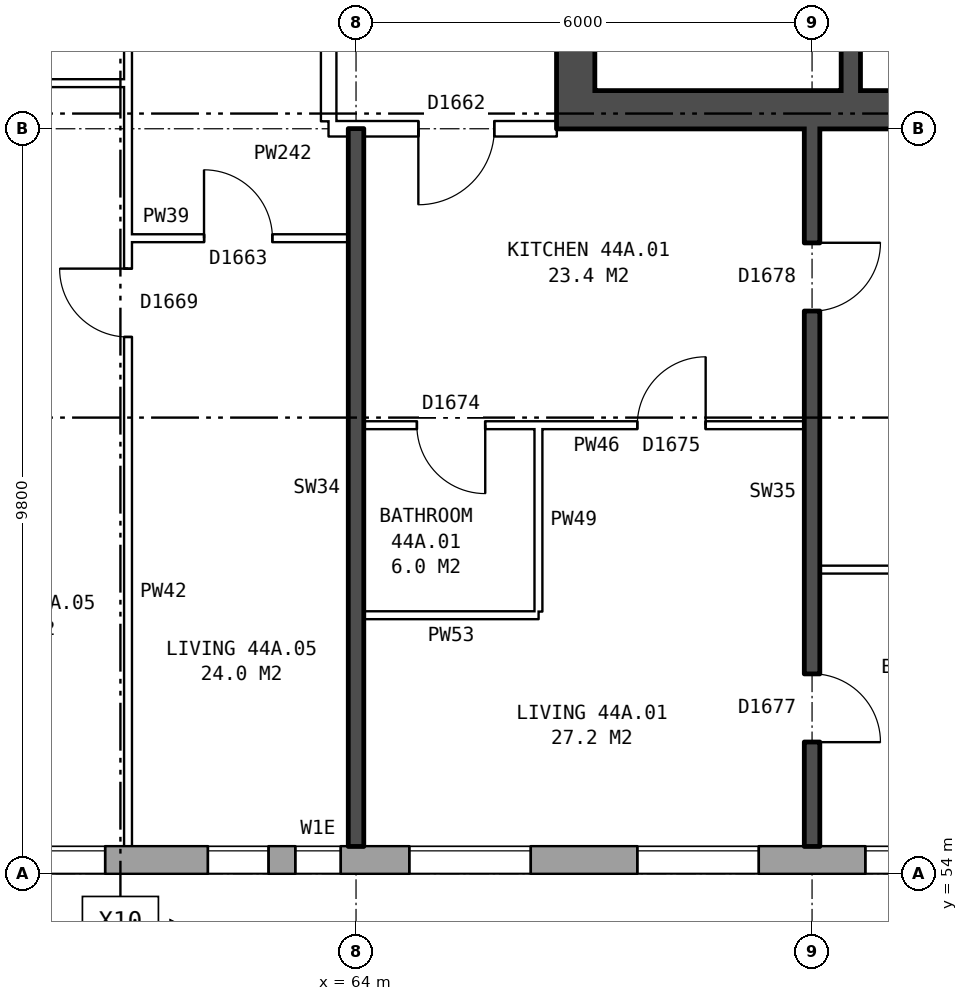
"""IFC4 building model, lengths in metres.
Left out: names, types, materials, properties, quantities, classifications, styles, units other than length and angle.
Written with IfcOpenShell. Run it as: python <this file> out.ifc"""

import sys

from ifc_helpers import new_model, si_unit, direction, frame, frame_2d, origin, place, context, subcontext, project, spatial, rectangle, extrude, element, fill, save


model = new_model("IFC4")
c1 = context("Model", 3, precision=1e-05, world=origin(), true_north=direction((0.0, 1.0)))
c2 = subcontext(c1, "Body", "Model", "MODEL_VIEW")
j1 = project(units=[si_unit("LENGTHUNIT", "METRE"), si_unit("PLANEANGLEUNIT", "RADIAN")], contexts=[c1])
p1 = place(None, origin())
s1 = spatial("IfcSite", under=j1, at=p1, CompositionType="ELEMENT")
p2 = place(p1, origin())
s2 = spatial("IfcBuilding", under=s1, at=p2, CompositionType="ELEMENT")
p3 = place(p2, frame((0.0, 0.0, 157.8)))
s3 = spatial("IfcBuildingStorey", under=s2, at=p3, CompositionType="ELEMENT", Elevation=157.8)
p4 = place(p3, frame((31.575, 54.18, 0.0), z_axis=(0.0, 0.0, 1.0), x_axis=(1.0, 0.0, 0.0)))
e1 = element("IfcWall", 1, at=p4, inside=s3, PredefinedType="STANDARD", context=c2, shape_type="SweptSolid", body=[
    extrude(rectangle(XDim=41.351, YDim=0.36, at=frame_2d((20.675, 0.0))), origin(), (0.0, 0.0, 1.0), 2.85),
])
p5 = place(p4, frame((3.125, 0.0, 0.8)))
e2 = element("IfcOpeningElement", 2, at=p5, cuts=e1, PredefinedType="OPENING", context=c2, shape_type="SweptSolid", body=[
    extrude(rectangle(XDim=1.6, YDim=1.8, at=frame_2d((0.8, 0.9))), frame((0.0, 0.19, 0.0), z_axis=(0.0, -1.0, 0.0), x_axis=(1.0, 0.0, 0.0)), (0.0, 0.0, 1.0), 0.38),
])
p6 = place(p4, frame((6.125, 0.0, 0.8)))
e3 = element("IfcOpeningElement", 3, at=p6, cuts=e1, PredefinedType="OPENING", context=c2, shape_type="SweptSolid", body=[
    extrude(rectangle(XDim=1.6, YDim=1.8, at=frame_2d((0.8, 0.9))), frame((0.0, 0.19, 0.0), z_axis=(0.0, -1.0, 0.0), x_axis=(1.0, 0.0, 0.0)), (0.0, 0.0, 1.0), 0.38),
])
p7 = place(p4, frame((8.625, 0.0, 0.8)))
e4 = element("IfcOpeningElement", 4, at=p7, cuts=e1, PredefinedType="OPENING", context=c2, shape_type="SweptSolid", body=[
    extrude(rectangle(XDim=1.0, YDim=1.8, at=frame_2d((0.5, 0.9))), frame((0.0, 0.19, 0.0), z_axis=(0.0, -1.0, 0.0), x_axis=(1.0, 0.0, 0.0)), (0.0, 0.0, 1.0), 0.38),
])
p8 = place(p4, frame((9.925, 0.0, 1.6)))
e5 = element("IfcOpeningElement", 5, at=p8, cuts=e1, PredefinedType="OPENING", context=c2, shape_type="SweptSolid", body=[
    extrude(rectangle(XDim=0.8, YDim=0.9, at=frame_2d((0.4, 0.45))), frame((0.0, 0.19, 0.0), z_axis=(0.0, -1.0, 0.0), x_axis=(1.0, 0.0, 0.0)), (0.0, 0.0, 1.0), 0.38),
])
p9 = place(p4, frame((15.125, 0.0, 0.8)))
e6 = element("IfcOpeningElement", 6, at=p9, cuts=e1, PredefinedType="OPENING", context=c2, shape_type="SweptSolid", body=[
    extrude(rectangle(XDim=1.6, YDim=1.8, at=frame_2d((0.8, 0.9))), frame((0.0, 0.19, 0.0), z_axis=(0.0, -1.0, 0.0), x_axis=(1.0, 0.0, 0.0)), (0.0, 0.0, 1.0), 0.38),
])
p10 = place(p4, frame((18.125, 0.0, 0.8)))
e7 = element("IfcOpeningElement", 7, at=p10, cuts=e1, PredefinedType="OPENING", context=c2, shape_type="SweptSolid", body=[
    extrude(rectangle(XDim=1.6, YDim=1.8, at=frame_2d((0.8, 0.9))), frame((0.0, 0.19, 0.0), z_axis=(0.0, -1.0, 0.0), x_axis=(1.0, 0.0, 0.0)), (0.0, 0.0, 1.0), 0.38),
])
p11 = place(p4, frame((21.125, 0.0, 0.8)))
e8 = element("IfcOpeningElement", 8, at=p11, cuts=e1, PredefinedType="OPENING", context=c2, shape_type="SweptSolid", body=[
    extrude(rectangle(XDim=1.6, YDim=1.8, at=frame_2d((0.8, 0.9))), frame((0.0, 0.19, 0.0), z_axis=(0.0, -1.0, 0.0), x_axis=(1.0, 0.0, 0.0)), (0.0, 0.0, 1.0), 0.38),
])
p12 = place(p4, frame((24.125, 0.0, 0.8)))
e9 = element("IfcOpeningElement", 9, at=p12, cuts=e1, PredefinedType="OPENING", context=c2, shape_type="SweptSolid", body=[
    extrude(rectangle(XDim=1.6, YDim=1.8, at=frame_2d((0.8, 0.9))), frame((0.0, 0.19, 0.0), z_axis=(0.0, -1.0, 0.0), x_axis=(1.0, 0.0, 0.0)), (0.0, 0.0, 1.0), 0.38),
])
p13 = place(p4, frame((26.625, 0.0, 0.8)))
e10 = element("IfcOpeningElement", 10, at=p13, cuts=e1, PredefinedType="OPENING", context=c2, shape_type="SweptSolid", body=[
    extrude(rectangle(XDim=1.4, YDim=1.8, at=frame_2d((0.7, 0.9))), frame((0.0, 0.19, 0.0), z_axis=(0.0, -1.0, 0.0), x_axis=(1.0, 0.0, 0.0)), (0.0, 0.0, 1.0), 0.38),
])
p14 = place(p4, frame((30.475, 0.0, 1.7)))
e11 = element("IfcOpeningElement", 11, at=p14, cuts=e1, PredefinedType="OPENING", context=c2, shape_type="SweptSolid", body=[
    extrude(rectangle(XDim=0.8, YDim=0.9, at=frame_2d((0.4, 0.45))), frame((0.0, 0.19, 0.0), z_axis=(0.0, -1.0, 0.0), x_axis=(1.0, 0.0, 0.0)), (0.0, 0.0, 1.0), 0.38),
])
p15 = place(p4, frame((33.125, 0.0, 0.8)))
e12 = element("IfcOpeningElement", 12, at=p15, cuts=e1, PredefinedType="OPENING", context=c2, shape_type="SweptSolid", body=[
    extrude(rectangle(XDim=1.6, YDim=1.8, at=frame_2d((0.8, 0.9))), frame((0.0, 0.19, 0.0), z_axis=(0.0, -1.0, 0.0), x_axis=(1.0, 0.0, 0.0)), (0.0, 0.0, 1.0), 0.38),
])
p16 = place(p4, frame((36.125, 0.0, 0.8)))
e13 = element("IfcOpeningElement", 13, at=p16, cuts=e1, PredefinedType="OPENING", context=c2, shape_type="SweptSolid", body=[
    extrude(rectangle(XDim=1.6, YDim=1.8, at=frame_2d((0.8, 0.9))), frame((0.0, 0.19, 0.0), z_axis=(0.0, -1.0, 0.0), x_axis=(1.0, 0.0, 0.0)), (0.0, 0.0, 1.0), 0.38),
])
p17 = place(p4, frame((39.125, 0.0, 0.8)))
e14 = element("IfcOpeningElement", 14, at=p17, cuts=e1, PredefinedType="OPENING", context=c2, shape_type="SweptSolid", body=[
    extrude(rectangle(XDim=1.6, YDim=1.8, at=frame_2d((0.8, 0.9))), frame((0.0, 0.19, 0.0), z_axis=(0.0, -1.0, 0.0), x_axis=(1.0, 0.0, 0.0)), (0.0, 0.0, 1.0), 0.38),
])
p18 = place(p4, frame((12.125, 0.0, 0.8)))
e15 = element("IfcOpeningElement", 15, at=p18, cuts=e1, PredefinedType="OPENING", context=c2, shape_type="SweptSolid", body=[
    extrude(rectangle(XDim=1.0, YDim=0.9, at=frame_2d((0.5, 0.45))), frame((0.0, 0.19, 0.0), z_axis=(0.0, -1.0, 0.0), x_axis=(1.0, 0.0, 0.0)), (0.0, 0.0, 1.0), 0.38),
])
p19 = place(p4, frame((13.425, 0.0, 0.8)))
e16 = element("IfcOpeningElement", 16, at=p19, cuts=e1, PredefinedType="OPENING", context=c2, shape_type="SweptSolid", body=[
    extrude(rectangle(XDim=0.8, YDim=1.8, at=frame_2d((0.4, 0.9))), frame((0.0, 0.19, 0.0), z_axis=(0.0, -1.0, 0.0), x_axis=(1.0, 0.0, 0.0)), (0.0, 0.0, 1.0), 0.38),
])
p20 = place(p4, frame((28.325, 0.0, 0.8)))
e17 = element("IfcOpeningElement", 17, at=p20, cuts=e1, PredefinedType="OPENING", context=c2, shape_type="SweptSolid", body=[
    extrude(rectangle(XDim=0.8, YDim=0.9, at=frame_2d((0.4, 0.45))), frame((0.0, 0.19, 0.0), z_axis=(0.0, -1.0, 0.0), x_axis=(1.0, 0.0, 0.0)), (0.0, 0.0, 1.0), 0.38),
])
p21 = place(p4, frame((31.625, 0.0, 0.8)))
e18 = element("IfcOpeningElement", 18, at=p21, cuts=e1, PredefinedType="OPENING", context=c2, shape_type="SweptSolid", body=[
    extrude(rectangle(XDim=0.6, YDim=1.8, at=frame_2d((0.3, 0.9))), frame((0.0, 0.19, 0.0), z_axis=(0.0, -1.0, 0.0), x_axis=(1.0, 0.0, 0.0)), (0.0, 0.0, 1.0), 0.38),
])
p22 = place(p3, frame((66.89, 63.8, 0.0), z_axis=(0.0, 0.0, 1.0), x_axis=(0.0, 1.0, 0.0)))
e19 = element("IfcWall", 19, at=p22, inside=s3, PredefinedType="SHEAR", context=c2, shape_type="SweptSolid", body=[
    extrude(rectangle(XDim=12.4, YDim=0.5, at=frame_2d((6.2, 0.0))), origin(), (0.0, 0.0, 1.0), 2.85),
])
p23 = place(p22, frame((1.325, 0.0, 0.0)))
e20 = element("IfcOpeningElement", 20, at=p23, cuts=e19, PredefinedType="OPENING", context=c2, shape_type="SweptSolid", body=[
    extrude(rectangle(XDim=1.1, YDim=2.1, at=frame_2d((0.55, 1.05))), frame((0.0, 0.26, 0.0), z_axis=(0.0, -1.0, 0.0), x_axis=(1.0, 0.0, 0.0)), (0.0, 0.0, 1.0), 0.52),
])
p24 = place(p22, frame((3.6, 0.0, 0.0)))
e21 = element("IfcOpeningElement", 21, at=p24, cuts=e19, PredefinedType="OPENING", context=c2, shape_type="SweptSolid", body=[
    extrude(rectangle(XDim=1.1, YDim=2.1, at=frame_2d((0.55, 1.05))), frame((0.0, 0.26, 0.0), z_axis=(0.0, -1.0, 0.0), x_axis=(1.0, 0.0, 0.0)), (0.0, 0.0, 1.0), 0.52),
])
p25 = place(p22, frame((5.8, 0.0, 0.0)))
e22 = element("IfcOpeningElement", 22, at=p25, cuts=e19, PredefinedType="OPENING", context=c2, shape_type="SweptSolid", body=[
    extrude(rectangle(XDim=1.1, YDim=2.1, at=frame_2d((0.55, 1.05))), frame((0.0, 0.26, 0.0), z_axis=(0.0, -1.0, 0.0), x_axis=(1.0, 0.0, 0.0)), (0.0, 0.0, 1.0), 0.52),
])
p26 = place(p22, frame((8.0, 0.0, 0.0)))
e23 = element("IfcOpeningElement", 23, at=p26, cuts=e19, PredefinedType="OPENING", context=c2, shape_type="SweptSolid", body=[
    extrude(rectangle(XDim=1.1, YDim=2.1, at=frame_2d((0.55, 1.05))), frame((0.0, 0.26, 0.0), z_axis=(0.0, -1.0, 0.0), x_axis=(1.0, 0.0, 0.0)), (0.0, 0.0, 1.0), 0.52),
])
p27 = place(p22, frame((9.9, 0.0, 0.0)))
e24 = element("IfcOpeningElement", 24, at=p27, cuts=e19, PredefinedType="OPENING", context=c2, shape_type="SweptSolid", body=[
    extrude(rectangle(XDim=1.1, YDim=2.1, at=frame_2d((0.55, 1.05))), frame((0.0, 0.26, 0.0), z_axis=(0.0, -1.0, 0.0), x_axis=(1.0, 0.0, 0.0)), (0.0, 0.0, 1.0), 0.52),
])
p28 = place(p3, frame((67.14, 64.05, 0.0), z_axis=(0.0, 0.0, 1.0), x_axis=(1.0, 0.0, 0.0)))
e25 = element("IfcWall", 25, at=p28, inside=s3, PredefinedType="SHEAR", context=c2, shape_type="SweptSolid", body=[
    extrude(rectangle(XDim=8.0, YDim=0.5, at=frame_2d((4.0, 0.0))), origin(), (0.0, 0.0, 1.0), 2.85),
])
p29 = place(p3, frame((70.51, 64.3, 0.0), z_axis=(0.0, 0.0, 1.0), x_axis=(0.0, 1.0, 0.0)))
e26 = element("IfcWall", 26, at=p29, inside=s3, PredefinedType="SHEAR", context=c2, shape_type="SweptSolid", body=[
    extrude(rectangle(XDim=2.425, YDim=0.25, at=frame_2d((1.212, 0.0))), origin(), (0.0, 0.0, 1.0), 2.85),
])
p30 = place(p3, frame((63.64, 63.9, 0.0), z_axis=(0.0, 0.0, 1.0), x_axis=(0.0, 1.0, 0.0)))
e27 = element("IfcWall", 27, at=p30, inside=s3, PredefinedType="PARTITIONING", context=c2, shape_type="SweptSolid", body=[
    extrude(rectangle(XDim=12.2, YDim=0.2, at=frame_2d((6.1, 0.0))), origin(), (0.0, 0.0, 1.0), 2.85),
])
p31 = place(p30, frame((5.1, 0.0, 0.0)))
e28 = element("IfcOpeningElement", 28, at=p31, cuts=e27, PredefinedType="OPENING", context=c2, shape_type="SweptSolid", body=[
    extrude(rectangle(XDim=2.0, YDim=2.1, at=frame_2d((1.0, 1.05))), frame((0.0, 0.11, 0.0), z_axis=(0.0, -1.0, 0.0), x_axis=(1.0, 0.0, 0.0)), (0.0, 0.0, 1.0), 0.22),
])
p32 = place(p3, frame((64.1, 57.4, 0.0), z_axis=(0.0, 0.0, 1.0), x_axis=(1.0, 0.0, 0.0)))
e29 = element("IfcWall", 29, at=p32, inside=s3, PredefinedType="PARTITIONING", context=c2, shape_type="SweptSolid", body=[
    extrude(rectangle(XDim=2.3, YDim=0.1, at=frame_2d((1.15, 0.0))), origin(), (0.0, 0.0, 1.0), 2.85),
])
p33 = place(p3, frame((70.1, 58.0, 0.0), z_axis=(0.0, 0.0, 1.0), x_axis=(1.0, 0.0, 0.0)))
e30 = element("IfcWall", 30, at=p33, inside=s3, PredefinedType="PARTITIONING", context=c2, shape_type="SweptSolid", body=[
    extrude(rectangle(XDim=5.54, YDim=0.1, at=frame_2d((2.77, 0.0))), origin(), (0.0, 0.0, 1.0), 2.85),
])
p34 = place(p3, frame((64.1, 59.9, 0.0), z_axis=(0.0, 0.0, 1.0), x_axis=(1.0, 0.0, 0.0)))
e31 = element("IfcWall", 31, at=p34, inside=s3, PredefinedType="PARTITIONING", context=c2, shape_type="SweptSolid", body=[
    extrude(rectangle(XDim=5.8, YDim=0.1, at=frame_2d((2.9, 0.0))), origin(), (0.0, 0.0, 1.0), 2.85),
])
p35 = place(p34, frame((3.6, 0.0, 0.0)))
e32 = element("IfcOpeningElement", 32, at=p35, cuts=e31, PredefinedType="OPENING", context=c2, shape_type="SweptSolid", body=[
    extrude(rectangle(XDim=0.9, YDim=2.1, at=frame_2d((0.45, 1.05))), frame((0.0, 0.06, 0.0), z_axis=(0.0, -1.0, 0.0), x_axis=(1.0, 0.0, 0.0)), (0.0, 0.0, 1.0), 0.12),
])
p36 = place(p34, frame((0.7, 0.0, 0.0)))
e33 = element("IfcOpeningElement", 33, at=p36, cuts=e31, PredefinedType="OPENING", context=c2, shape_type="SweptSolid", body=[
    extrude(rectangle(XDim=0.9, YDim=2.1, at=frame_2d((0.45, 1.05))), frame((0.0, 0.06, 0.0), z_axis=(0.0, -1.0, 0.0), x_axis=(1.0, 0.0, 0.0)), (0.0, 0.0, 1.0), 0.12),
])
p37 = place(p3, frame((61.0, 62.36, 0.0), z_axis=(0.0, 0.0, 1.0), x_axis=(1.0, 0.0, 0.0)))
e34 = element("IfcWall", 34, at=p37, inside=s3, PredefinedType="PARTITIONING", context=c2, shape_type="SweptSolid", body=[
    extrude(rectangle(XDim=2.9, YDim=0.1, at=frame_2d((1.45, 0.0))), origin(), (0.0, 0.0, 1.0), 2.85),
])
p38 = place(p37, frame((1.0, 0.0, 0.0)))
e35 = element("IfcOpeningElement", 35, at=p38, cuts=e34, PredefinedType="OPENING", context=c2, shape_type="SweptSolid", body=[
    extrude(rectangle(XDim=0.9, YDim=2.1, at=frame_2d((0.45, 1.05))), frame((0.0, 0.06, 0.0), z_axis=(0.0, -1.0, 0.0), x_axis=(1.0, 0.0, 0.0)), (0.0, 0.0, 1.0), 0.12),
])
p39 = place(p3, frame((63.64, 63.8, 0.0), z_axis=(0.0, 0.0, 1.0), x_axis=(1.0, 0.0, 0.0)))
e36 = element("IfcWall", 36, at=p39, inside=s3, PredefinedType="PARTITIONING", context=c2, shape_type="SweptSolid", body=[
    extrude(rectangle(XDim=3.0, YDim=0.2, at=frame_2d((1.5, 0.0))), origin(), (0.0, 0.0, 1.0), 2.85),
])
p40 = place(p39, frame((1.18, 0.0, 0.0)))
e37 = element("IfcOpeningElement", 37, at=p40, cuts=e36, PredefinedType="OPENING", context=c2, shape_type="SweptSolid", body=[
    extrude(rectangle(XDim=1.0, YDim=2.1, at=frame_2d((0.5, 1.05))), frame((0.0, 0.11, 0.0), z_axis=(0.0, -1.0, 0.0), x_axis=(1.0, 0.0, 0.0)), (0.0, 0.0, 1.0), 0.22),
])
p41 = place(p3, frame((58.1, 64.4, 0.0), z_axis=(0.0, 0.0, 1.0), x_axis=(1.0, 0.0, 0.0)))
e38 = element("IfcWall", 38, at=p41, inside=s3, PredefinedType="PARTITIONING", context=c2, shape_type="SweptSolid", body=[
    extrude(rectangle(XDim=2.9, YDim=0.1, at=frame_2d((1.45, 0.0))), origin(), (0.0, 0.0, 1.0), 2.85),
])
p42 = place(p3, frame((61.0, 54.36, 0.0), z_axis=(0.0, 0.0, 1.0), x_axis=(0.0, 1.0, 0.0)))
e39 = element("IfcWall", 39, at=p42, inside=s3, PredefinedType="PARTITIONING", context=c2, shape_type="SweptSolid", body=[
    extrude(rectangle(XDim=14.34, YDim=0.1, at=frame_2d((7.17, 0.0))), origin(), (0.0, 0.0, 1.0), 2.85),
])
p43 = place(p42, frame((6.7, 0.0, 0.0)))
e40 = element("IfcOpeningElement", 40, at=p43, cuts=e39, PredefinedType="OPENING", context=c2, shape_type="SweptSolid", body=[
    extrude(rectangle(XDim=0.9, YDim=2.1, at=frame_2d((0.45, 1.05))), frame((0.0, 0.06, 0.0), z_axis=(0.0, -1.0, 0.0), x_axis=(1.0, 0.0, 0.0)), (0.0, 0.0, 1.0), 0.12),
])
p44 = place(p42, frame((12.54, 0.0, 0.0)))
e41 = element("IfcOpeningElement", 41, at=p44, cuts=e39, PredefinedType="OPENING", context=c2, shape_type="SweptSolid", body=[
    extrude(rectangle(XDim=0.9, YDim=2.1, at=frame_2d((0.45, 1.05))), frame((0.0, 0.06, 0.0), z_axis=(0.0, -1.0, 0.0), x_axis=(1.0, 0.0, 0.0)), (0.0, 0.0, 1.0), 0.12),
])
p45 = place(p3, frame((64.0, 54.36, 0.0), z_axis=(0.0, 0.0, 1.0), x_axis=(0.0, 1.0, 0.0)))
e42 = element("IfcWall", 42, at=p45, inside=s3, PredefinedType="SOLIDWALL", context=c2, shape_type="SweptSolid", body=[
    extrude(rectangle(XDim=9.44, YDim=0.2, at=frame_2d((4.72, 0.0))), origin(), (0.0, 0.0, 1.0), 2.85),
])
p46 = place(p3, frame((66.4, 57.45, 0.0), z_axis=(0.0, 0.0, 1.0), x_axis=(0.0, 1.0, 0.0)))
e43 = element("IfcWall", 43, at=p46, inside=s3, PredefinedType="PARTITIONING", context=c2, shape_type="SweptSolid", body=[
    extrude(rectangle(XDim=2.4, YDim=0.1, at=frame_2d((1.2, 0.0))), origin(), (0.0, 0.0, 1.0), 2.85),
])
p47 = place(p3, frame((70.0, 54.36, 0.0), z_axis=(0.0, 0.0, 1.0), x_axis=(0.0, 1.0, 0.0)))
e44 = element("IfcWall", 44, at=p47, inside=s3, PredefinedType="SOLIDWALL", context=c2, shape_type="SweptSolid", body=[
    extrude(rectangle(XDim=9.44, YDim=0.2, at=frame_2d((4.72, 0.0))), origin(), (0.0, 0.0, 1.0), 2.85),
])
p48 = place(p47, frame((1.37, 0.0, 0.0)))
e45 = element("IfcOpeningElement", 45, at=p48, cuts=e44, PredefinedType="OPENING", context=c2, shape_type="SweptSolid", body=[
    extrude(rectangle(XDim=0.9, YDim=2.1, at=frame_2d((0.45, 1.05))), frame((0.0, 0.11, 0.0), z_axis=(0.0, -1.0, 0.0), x_axis=(1.0, 0.0, 0.0)), (0.0, 0.0, 1.0), 0.22),
])
p49 = place(p47, frame((7.04, 0.0, 0.0)))
e46 = element("IfcOpeningElement", 46, at=p49, cuts=e44, PredefinedType="OPENING", context=c2, shape_type="SweptSolid", body=[
    extrude(rectangle(XDim=0.9, YDim=2.1, at=frame_2d((0.45, 1.05))), frame((0.0, 0.11, 0.0), z_axis=(0.0, -1.0, 0.0), x_axis=(1.0, 0.0, 0.0)), (0.0, 0.0, 1.0), 0.22),
])
p50 = place(p14, origin())
e47 = element("IfcWindow", 47, at=p50, inside=s3, PartitioningType="SINGLE_PANEL", PredefinedType="WINDOW", context=c2, shape_type="SweptSolid", body=[
    extrude(rectangle(XDim=0.8, YDim=0.9, at=frame_2d((0.4, 0.45))), frame((0.0, 0.15, 0.0), z_axis=(0.0, -1.0, 0.0), x_axis=(1.0, 0.0, 0.0)), (0.0, 0.0, 1.0), 0.06),
])
fill(e11, e47)
p51 = place(p15, origin())
e48 = element("IfcWindow", 48, at=p51, inside=s3, PartitioningType="SINGLE_PANEL", PredefinedType="WINDOW", context=c2, shape_type="SweptSolid", body=[
    extrude(rectangle(XDim=1.6, YDim=1.8, at=frame_2d((0.8, 0.9))), frame((0.0, 0.15, 0.0), z_axis=(0.0, -1.0, 0.0), x_axis=(1.0, 0.0, 0.0)), (0.0, 0.0, 1.0), 0.06),
])
fill(e12, e48)
p52 = place(p16, origin())
e49 = element("IfcWindow", 49, at=p52, inside=s3, PartitioningType="SINGLE_PANEL", PredefinedType="WINDOW", context=c2, shape_type="SweptSolid", body=[
    extrude(rectangle(XDim=1.6, YDim=1.8, at=frame_2d((0.8, 0.9))), frame((0.0, 0.15, 0.0), z_axis=(0.0, -1.0, 0.0), x_axis=(1.0, 0.0, 0.0)), (0.0, 0.0, 1.0), 0.06),
])
fill(e13, e49)
p53 = place(p17, origin())
e50 = element("IfcWindow", 50, at=p53, inside=s3, PartitioningType="SINGLE_PANEL", PredefinedType="WINDOW", context=c2, shape_type="SweptSolid", body=[
    extrude(rectangle(XDim=1.6, YDim=1.8, at=frame_2d((0.8, 0.9))), frame((0.0, 0.15, 0.0), z_axis=(0.0, -1.0, 0.0), x_axis=(1.0, 0.0, 0.0)), (0.0, 0.0, 1.0), 0.06),
])
fill(e14, e50)
p54 = place(p48, frame((0.9, 0.0, 0.0), z_axis=(0.0, 0.0, 1.0), x_axis=(-1.0, 0.0, 0.0)))
e51 = element("IfcDoor", 51, at=p54, inside=s3, OperationType="SINGLE_SWING_RIGHT", PredefinedType="DOOR", context=c2, shape_type="SweptSolid", body=[
    extrude(rectangle(XDim=0.9, YDim=2.1, at=frame_2d((0.45, 1.05))), frame((0.0, 0.025, 0.0), z_axis=(0.0, -1.0, 0.0), x_axis=(1.0, 0.0, 0.0)), (0.0, 0.0, 1.0), 0.05),
])
fill(e45, e51)
p55 = place(p49, frame((0.9, 0.0, 0.0), z_axis=(0.0, 0.0, 1.0), x_axis=(-1.0, 0.0, 0.0)))
e52 = element("IfcDoor", 52, at=p55, inside=s3, OperationType="SINGLE_SWING_LEFT", PredefinedType="DOOR", context=c2, shape_type="SweptSolid", body=[
    extrude(rectangle(XDim=0.9, YDim=2.1, at=frame_2d((0.45, 1.05))), frame((0.0, 0.025, 0.0), z_axis=(0.0, -1.0, 0.0), x_axis=(1.0, 0.0, 0.0)), (0.0, 0.0, 1.0), 0.05),
])
fill(e46, e52)
p56 = place(p40, frame((1.0, 0.0, 0.0), z_axis=(0.0, 0.0, 1.0), x_axis=(-1.0, 0.0, 0.0)))
e53 = element("IfcDoor", 53, at=p56, inside=s3, OperationType="SINGLE_SWING_RIGHT", PredefinedType="DOOR", context=c2, shape_type="SweptSolid", body=[
    extrude(rectangle(XDim=1.0, YDim=2.1, at=frame_2d((0.5, 1.05))), frame((0.0, 0.025, 0.0), z_axis=(0.0, -1.0, 0.0), x_axis=(1.0, 0.0, 0.0)), (0.0, 0.0, 1.0), 0.05),
])
fill(e37, e53)
p57 = place(p35, origin())
e54 = element("IfcDoor", 54, at=p57, inside=s3, OperationType="SINGLE_SWING_RIGHT", PredefinedType="DOOR", context=c2, shape_type="SweptSolid", body=[
    extrude(rectangle(XDim=0.9, YDim=2.1, at=frame_2d((0.45, 1.05))), frame((0.0, 0.025, 0.0), z_axis=(0.0, -1.0, 0.0), x_axis=(1.0, 0.0, 0.0)), (0.0, 0.0, 1.0), 0.05),
])
fill(e32, e54)
p58 = place(p36, frame((0.9, 0.0, 0.0), z_axis=(0.0, 0.0, 1.0), x_axis=(-1.0, 0.0, 0.0)))
e55 = element("IfcDoor", 55, at=p58, inside=s3, OperationType="SINGLE_SWING_LEFT", PredefinedType="DOOR", context=c2, shape_type="SweptSolid", body=[
    extrude(rectangle(XDim=0.9, YDim=2.1, at=frame_2d((0.45, 1.05))), frame((0.0, 0.025, 0.0), z_axis=(0.0, -1.0, 0.0), x_axis=(1.0, 0.0, 0.0)), (0.0, 0.0, 1.0), 0.05),
])
fill(e33, e55)
p59 = place(p43, origin())
e56 = element("IfcDoor", 56, at=p59, inside=s3, OperationType="SINGLE_SWING_RIGHT", PredefinedType="DOOR", context=c2, shape_type="SweptSolid", body=[
    extrude(rectangle(XDim=0.9, YDim=2.1, at=frame_2d((0.45, 1.05))), frame((0.0, 0.025, 0.0), z_axis=(0.0, -1.0, 0.0), x_axis=(1.0, 0.0, 0.0)), (0.0, 0.0, 1.0), 0.05),
])
fill(e40, e56)
p60 = place(p38, origin())
e57 = element("IfcDoor", 57, at=p60, inside=s3, OperationType="SINGLE_SWING_LEFT", PredefinedType="DOOR", context=c2, shape_type="SweptSolid", body=[
    extrude(rectangle(XDim=0.9, YDim=2.1, at=frame_2d((0.45, 1.05))), frame((0.0, 0.025, 0.0), z_axis=(0.0, -1.0, 0.0), x_axis=(1.0, 0.0, 0.0)), (0.0, 0.0, 1.0), 0.05),
])
fill(e35, e57)
p61 = place(p20, origin())
e58 = element("IfcWindow", 58, at=p61, inside=s3, PartitioningType="SINGLE_PANEL", PredefinedType="WINDOW", context=c2, shape_type="SweptSolid", body=[
    extrude(rectangle(XDim=0.8, YDim=0.9, at=frame_2d((0.4, 0.45))), frame((0.0, 0.15, 0.0), z_axis=(0.0, -1.0, 0.0), x_axis=(1.0, 0.0, 0.0)), (0.0, 0.0, 1.0), 0.06),
])
fill(e17, e58)
p62 = place(p21, origin())
e59 = element("IfcWindow", 59, at=p62, inside=s3, PartitioningType="SINGLE_PANEL", PredefinedType="WINDOW", context=c2, shape_type="SweptSolid", body=[
    extrude(rectangle(XDim=0.6, YDim=1.8, at=frame_2d((0.3, 0.9))), frame((0.0, 0.15, 0.0), z_axis=(0.0, -1.0, 0.0), x_axis=(1.0, 0.0, 0.0)), (0.0, 0.0, 1.0), 0.06),
])
fill(e18, e59)
save(model, sys.argv[1])
